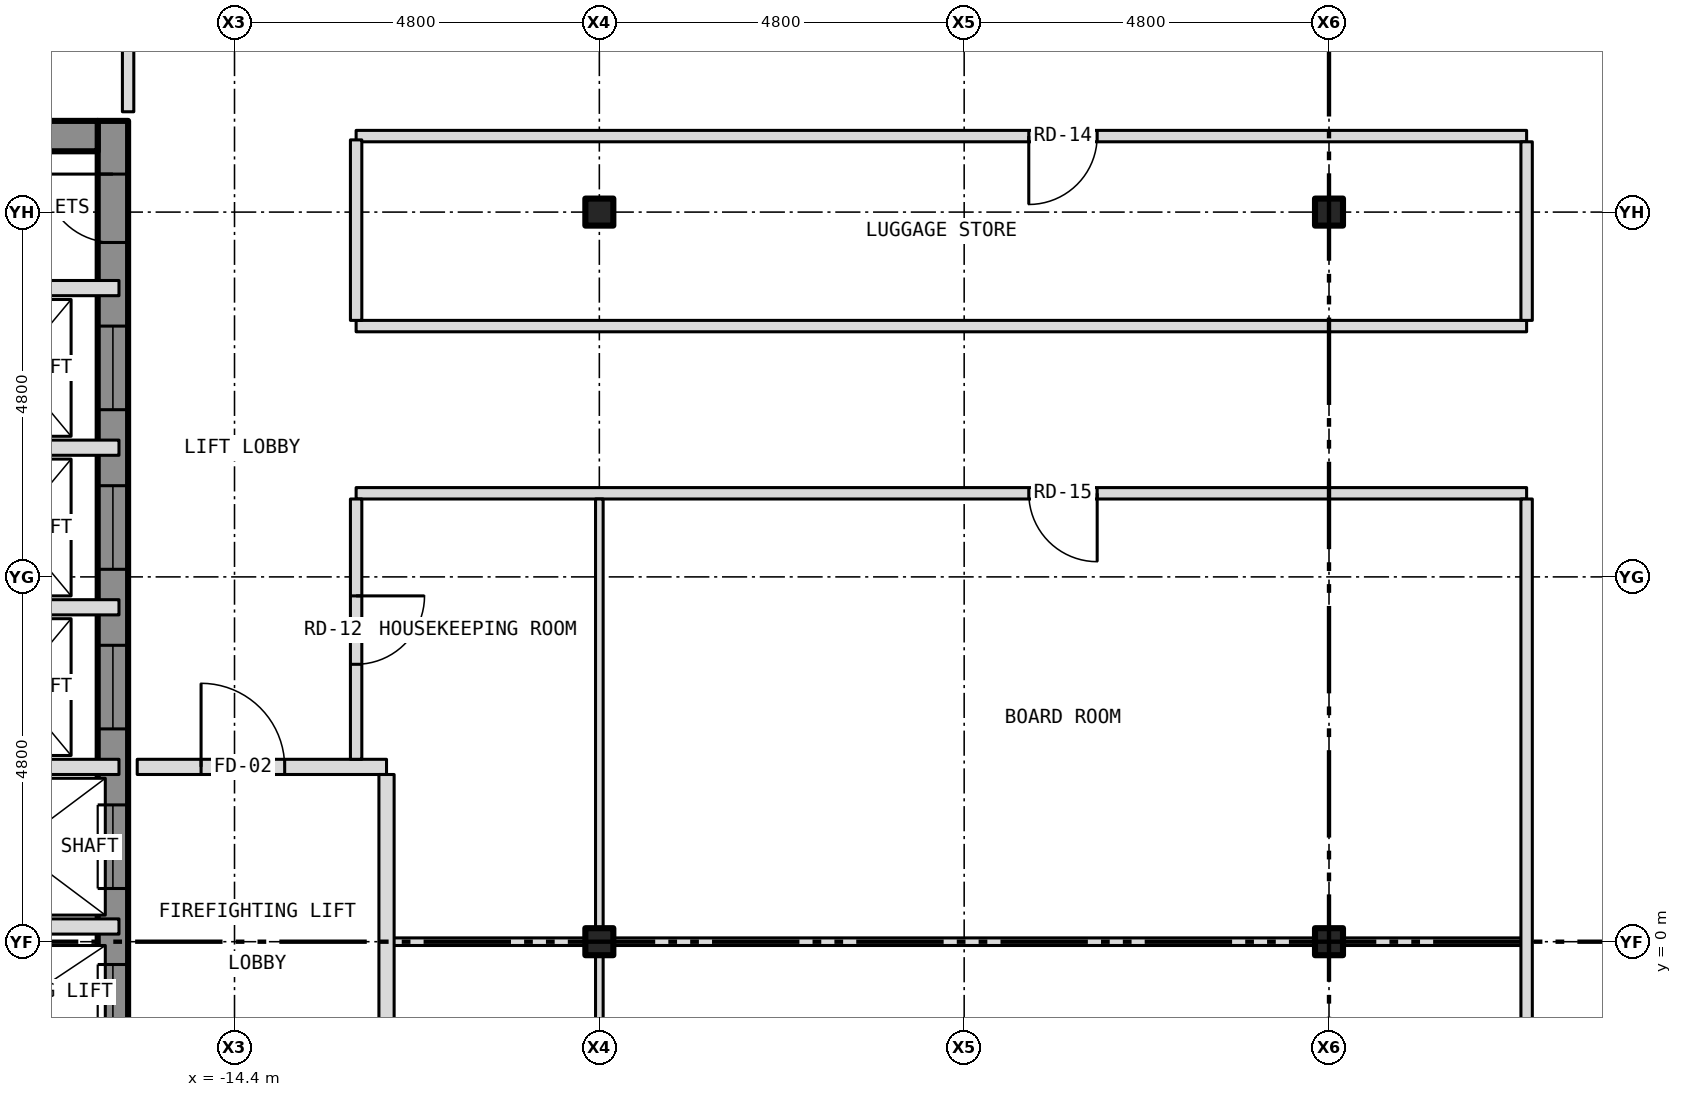
"""IFC4 building model, lengths in metres.
Left out: names, types, materials, properties, quantities, classifications, styles, units other than length and angle.
Written with IfcOpenShell. Run it as: python <this file> out.ifc"""

import sys

from ifc_helpers import new_model, si_unit, direction, frame, frame_2d, origin, origin_2d, place, context, subcontext, project, spatial, rectangle, i_section, extrude, element, fill, save


model = new_model("IFC4")
c1 = context("Model", 3, precision=1e-05, world=origin(), true_north=direction((0.0, 1.0)))
c2 = subcontext(c1, "Body", "Model", "MODEL_VIEW")
j1 = project(units=[si_unit("LENGTHUNIT", "METRE"), si_unit("PLANEANGLEUNIT", "RADIAN")], contexts=[c1])
p1 = place(None, origin())
s1 = spatial("IfcSite", under=j1, at=p1, CompositionType="ELEMENT")
p2 = place(p1, origin())
s2 = spatial("IfcBuilding", under=s1, at=p2, CompositionType="ELEMENT")
p3 = place(p2, frame((0.0, 0.0, 251.5)))
s3 = spatial("IfcBuildingStorey", under=s2, at=p3, CompositionType="ELEMENT", Elevation=251.5)
for number, where, z_axis, x_axis in (
    (1, (-9.6, 0.0, -0.15), (0.0, 0.0, 1.0), (1.0, 0.0, 0.0)),
    (2, (-9.6, 9.6, -0.15), (0.0, 0.0, 1.0), (1.0, 0.0, 0.0)),
    (3, (0.0, 0.0, -0.15), (0.0, 0.0, 1.0), (1.0, 0.0, 0.0)),
    (4, (0.0, 9.6, -0.15), (0.0, 0.0, 1.0), (1.0, 0.0, 0.0)),
):
    element("IfcColumn", number, at=place(p3, frame(where, z_axis=z_axis, x_axis=x_axis)), inside=s3, PredefinedType="COLUMN", context=c2, shape_type="SweptSolid", body=[
        extrude(i_section(OverallWidth=0.368, OverallDepth=0.356, WebThickness=0.011, FlangeThickness=0.018, at=origin_2d()), origin(), (0.0, 0.0, 1.0), 3.5),
    ])
p4 = place(p3, frame((-16.0, -10.8, 0.0), z_axis=(0.0, 0.0, 1.0), x_axis=(0.0, 1.0, 0.0)))
e5 = element("IfcWall", 5, at=p4, inside=s3, PredefinedType="SHEAR", context=c2, shape_type="SweptSolid", body=[
    extrude(rectangle(XDim=21.6, YDim=0.4, at=frame_2d((10.8, 0.0))), origin(), (0.0, 0.0, 1.0), 3.25),
])
p5 = place(p4, frame((9.4, 0.0, 0.0)))
e6 = element("IfcOpeningElement", 6, at=p5, cuts=e5, PredefinedType="OPENING", context=c2, shape_type="SweptSolid", body=[
    extrude(rectangle(XDim=1.1, YDim=2.1, at=frame_2d((0.55, 1.05))), frame((0.0, 0.212, 0.0), z_axis=(0.0, -1.0, 0.0), x_axis=(1.0, 0.0, 0.0)), (0.0, 0.0, 1.0), 0.424),
])
p6 = place(p4, frame((11.5, 0.0, 0.0)))
e7 = element("IfcOpeningElement", 7, at=p6, cuts=e5, PredefinedType="OPENING", context=c2, shape_type="SweptSolid", body=[
    extrude(rectangle(XDim=1.1, YDim=2.1, at=frame_2d((0.55, 1.05))), frame((0.0, 0.212, 0.0), z_axis=(0.0, -1.0, 0.0), x_axis=(1.0, 0.0, 0.0)), (0.0, 0.0, 1.0), 0.424),
])
p7 = place(p4, frame((13.6, 0.0, 0.0)))
e8 = element("IfcOpeningElement", 8, at=p7, cuts=e5, PredefinedType="OPENING", context=c2, shape_type="SweptSolid", body=[
    extrude(rectangle(XDim=1.1, YDim=2.1, at=frame_2d((0.55, 1.05))), frame((0.0, 0.212, 0.0), z_axis=(0.0, -1.0, 0.0), x_axis=(1.0, 0.0, 0.0)), (0.0, 0.0, 1.0), 0.424),
])
p8 = place(p4, frame((15.7, 0.0, 0.0)))
e9 = element("IfcOpeningElement", 9, at=p8, cuts=e5, PredefinedType="OPENING", context=c2, shape_type="SweptSolid", body=[
    extrude(rectangle(XDim=1.1, YDim=2.1, at=frame_2d((0.55, 1.05))), frame((0.0, 0.212, 0.0), z_axis=(0.0, -1.0, 0.0), x_axis=(1.0, 0.0, 0.0)), (0.0, 0.0, 1.0), 0.424),
])
p9 = place(p4, frame((17.8, 0.0, 0.0)))
e10 = element("IfcOpeningElement", 10, at=p9, cuts=e5, PredefinedType="OPENING", context=c2, shape_type="SweptSolid", body=[
    extrude(rectangle(XDim=1.1, YDim=2.1, at=frame_2d((0.55, 1.05))), frame((0.0, 0.212, 0.0), z_axis=(0.0, -1.0, 0.0), x_axis=(1.0, 0.0, 0.0)), (0.0, 0.0, 1.0), 0.424),
])
p10 = place(p4, frame((0.458, 0.0, 0.0)))
e11 = element("IfcOpeningElement", 11, at=p10, cuts=e5, PredefinedType="OPENING", context=c2, shape_type="SweptSolid", body=[
    extrude(rectangle(XDim=1.1, YDim=2.1, at=frame_2d((0.55, 1.05))), frame((0.0, 0.212, 0.0), z_axis=(0.0, -1.0, 0.0), x_axis=(1.0, 0.0, 0.0)), (0.0, 0.0, 1.0), 0.424),
])
p11 = place(p4, frame((7.5, 0.0, 0.0)))
e12 = element("IfcOpeningElement", 12, at=p11, cuts=e5, PredefinedType="OPENING", context=c2, shape_type="SweptSolid", body=[
    extrude(rectangle(XDim=1.1, YDim=2.1, at=frame_2d((0.55, 1.05))), frame((0.0, 0.212, 0.0), z_axis=(0.0, -1.0, 0.0), x_axis=(1.0, 0.0, 0.0)), (0.0, 0.0, 1.0), 0.424),
])
p12 = place(p4, frame((20.0, 0.0, 0.0)))
e13 = element("IfcOpeningElement", 13, at=p12, cuts=e5, PredefinedType="OPENING", context=c2, shape_type="SweptSolid", body=[
    extrude(rectangle(XDim=0.9, YDim=2.1, at=frame_2d((0.45, 1.05))), frame((0.0, 0.212, 0.0), z_axis=(0.0, -1.0, 0.0), x_axis=(1.0, 0.0, 0.0)), (0.0, 0.0, 1.0), 0.424),
])
p13 = place(p3, frame((-20.0, 10.6, 0.0), z_axis=(0.0, 0.0, 1.0), x_axis=(1.0, 0.0, 0.0)))
e14 = element("IfcWall", 14, at=p13, inside=s3, PredefinedType="SHEAR", context=c2, shape_type="SweptSolid", body=[
    extrude(rectangle(XDim=3.8, YDim=0.4, at=frame_2d((1.9, 0.0))), origin(), (0.0, 0.0, 1.0), 3.25),
])
p14 = place(p3, frame((-12.4, 0.0, 0.0), z_axis=(0.0, 0.0, 1.0), x_axis=(1.0, 0.0, 0.0)))
e15 = element("IfcWall", 15, at=p14, inside=s3, PredefinedType="PARTITIONING", context=c2, shape_type="SweptSolid", body=[
    extrude(rectangle(XDim=2.616, YDim=0.1, at=frame_2d((1.308, 0.0))), origin(), (0.0, 0.0, 1.0), 2.728),
])
p15 = place(p3, frame((-9.784, 0.0, 0.0), z_axis=(0.0, 0.0, 1.0), x_axis=(1.0, 0.0, 0.0)))
e16 = element("IfcWall", 16, at=p15, inside=s3, PredefinedType="PARTITIONING", context=c2, shape_type="SweptSolid", body=[
    extrude(rectangle(XDim=0.368, YDim=0.1, at=frame_2d((0.184, 0.0))), origin(), (0.0, 0.0, 1.0), 3.35),
])
p16 = place(p3, frame((-9.416, 0.0, 0.0), z_axis=(0.0, 0.0, 1.0), x_axis=(1.0, 0.0, 0.0)))
e17 = element("IfcWall", 17, at=p16, inside=s3, PredefinedType="PARTITIONING", context=c2, shape_type="SweptSolid", body=[
    extrude(rectangle(XDim=9.232, YDim=0.1, at=frame_2d((4.616, 0.0))), origin(), (0.0, 0.0, 1.0), 2.728),
])
p17 = place(p3, frame((-0.184, 0.0, 0.0), z_axis=(0.0, 0.0, 1.0), x_axis=(1.0, 0.0, 0.0)))
e18 = element("IfcWall", 18, at=p17, inside=s3, PredefinedType="PARTITIONING", context=c2, shape_type="SweptSolid", body=[
    extrude(rectangle(XDim=0.368, YDim=0.1, at=frame_2d((0.184, 0.0))), origin(), (0.0, 0.0, 1.0), 3.35),
])
p18 = place(p3, frame((0.184, 0.0, 0.0), z_axis=(0.0, 0.0, 1.0), x_axis=(1.0, 0.0, 0.0)))
e19 = element("IfcWall", 19, at=p18, inside=s3, PredefinedType="PARTITIONING", context=c2, shape_type="SweptSolid", body=[
    extrude(rectangle(XDim=2.416, YDim=0.1, at=frame_2d((1.208, 0.0))), origin(), (0.0, 0.0, 1.0), 2.728),
])
for number, where, z_axis, x_axis in (
    (20, (-18.8, 0.2, 0.0), (0.0, 0.0, 1.0), (1.0, 0.0, 0.0)),
    (21, (-18.8, 2.3, 0.0), (0.0, 0.0, 1.0), (1.0, 0.0, 0.0)),
):
    element("IfcWall", number, at=place(p3, frame(where, z_axis=z_axis, x_axis=x_axis)), inside=s3, PredefinedType="PARTITIONING", context=c2, shape_type="SweptSolid", body=[
        extrude(rectangle(XDim=2.88, YDim=0.2, at=frame_2d((1.44, 0.0))), origin(), (0.0, 0.0, 1.0), 3.25),
    ])
p19 = place(p3, frame((-15.68, 2.3, 0.0), z_axis=(0.0, 0.0, 1.0), x_axis=(1.0, 0.0, 0.0)))
e22 = element("IfcWall", 22, at=p19, inside=s3, PredefinedType="PARTITIONING", context=c2, shape_type="SweptSolid", body=[
    extrude(rectangle(XDim=3.28, YDim=0.2, at=frame_2d((1.64, 0.0))), origin(), (0.0, 0.0, 1.0), 3.35),
])
p20 = place(p19, frame((0.84, 0.0, 0.0)))
e23 = element("IfcOpeningElement", 23, at=p20, cuts=e22, PredefinedType="OPENING", context=c2, shape_type="SweptSolid", body=[
    extrude(rectangle(XDim=1.1, YDim=2.1, at=frame_2d((0.55, 1.05))), frame((0.0, 0.112, 0.0), z_axis=(0.0, -1.0, 0.0), x_axis=(1.0, 0.0, 0.0)), (0.0, 0.0, 1.0), 0.224),
])
p21 = place(p3, frame((-18.8, 4.4, 0.0), z_axis=(0.0, 0.0, 1.0), x_axis=(1.0, 0.0, 0.0)))
e24 = element("IfcWall", 24, at=p21, inside=s3, PredefinedType="PARTITIONING", context=c2, shape_type="SweptSolid", body=[
    extrude(rectangle(XDim=2.88, YDim=0.2, at=frame_2d((1.44, 0.0))), origin(), (0.0, 0.0, 1.0), 3.25),
])
p22 = place(p3, frame((-12.8, 5.9, 0.0), z_axis=(0.0, 0.0, 1.0), x_axis=(1.0, 0.0, 0.0)))
e25 = element("IfcWall", 25, at=p22, inside=s3, PredefinedType="PARTITIONING", context=c2, shape_type="SweptSolid", body=[
    extrude(rectangle(XDim=15.4, YDim=0.15, at=frame_2d((7.7, 0.0))), origin(), (0.0, 0.0, 1.0), 3.35),
])
p23 = place(p22, frame((8.85, 0.0, 0.0)))
e26 = element("IfcOpeningElement", 26, at=p23, cuts=e25, PredefinedType="OPENING", context=c2, shape_type="SweptSolid", body=[
    extrude(rectangle(XDim=0.9, YDim=2.1, at=frame_2d((0.45, 1.05))), frame((0.0, 0.087, 0.0), z_axis=(0.0, -1.0, 0.0), x_axis=(1.0, 0.0, 0.0)), (0.0, 0.0, 1.0), 0.174),
])
p24 = place(p3, frame((-18.8, 6.5, 0.0), z_axis=(0.0, 0.0, 1.0), x_axis=(1.0, 0.0, 0.0)))
e27 = element("IfcWall", 27, at=p24, inside=s3, PredefinedType="PARTITIONING", context=c2, shape_type="SweptSolid", body=[
    extrude(rectangle(XDim=2.88, YDim=0.2, at=frame_2d((1.44, 0.0))), origin(), (0.0, 0.0, 1.0), 3.25),
])
p25 = place(p3, frame((-12.8, 8.1, 0.0), z_axis=(0.0, 0.0, 1.0), x_axis=(1.0, 0.0, 0.0)))
e28 = element("IfcWall", 28, at=p25, inside=s3, PredefinedType="PARTITIONING", context=c2, shape_type="SweptSolid", body=[
    extrude(rectangle(XDim=15.4, YDim=0.15, at=frame_2d((7.7, 0.0))), origin(), (0.0, 0.0, 1.0), 3.35),
])
p26 = place(p3, frame((-18.8, 8.6, 0.0), z_axis=(0.0, 0.0, 1.0), x_axis=(1.0, 0.0, 0.0)))
e29 = element("IfcWall", 29, at=p26, inside=s3, PredefinedType="PARTITIONING", context=c2, shape_type="SweptSolid", body=[
    extrude(rectangle(XDim=2.88, YDim=0.2, at=frame_2d((1.44, 0.0))), origin(), (0.0, 0.0, 1.0), 3.25),
])
p27 = place(p3, frame((-12.8, 10.6, 0.0), z_axis=(0.0, 0.0, 1.0), x_axis=(1.0, 0.0, 0.0)))
e30 = element("IfcWall", 30, at=p27, inside=s3, PredefinedType="PARTITIONING", context=c2, shape_type="SweptSolid", body=[
    extrude(rectangle(XDim=15.4, YDim=0.15, at=frame_2d((7.7, 0.0))), origin(), (0.0, 0.0, 1.0), 3.35),
])
p28 = place(p27, frame((8.85, 0.0, 0.0)))
e31 = element("IfcOpeningElement", 31, at=p28, cuts=e30, PredefinedType="OPENING", context=c2, shape_type="SweptSolid", body=[
    extrude(rectangle(XDim=0.9, YDim=2.1, at=frame_2d((0.45, 1.05))), frame((0.0, 0.087, 0.0), z_axis=(0.0, -1.0, 0.0), x_axis=(1.0, 0.0, 0.0)), (0.0, 0.0, 1.0), 0.174),
])
p29 = place(p3, frame((-15.8, 10.92, 0.0), z_axis=(0.0, 0.0, 1.0), x_axis=(0.0, 1.0, 0.0)))
e32 = element("IfcWall", 32, at=p29, inside=s3, PredefinedType="PARTITIONING", context=c2, shape_type="SweptSolid", body=[
    extrude(rectangle(XDim=1.805, YDim=0.15, at=frame_2d((0.903, 0.0))), origin(), (0.0, 0.0, 1.0), 3.35),
])
p30 = place(p3, frame((-12.8, 2.4, 0.0), z_axis=(0.0, 0.0, 1.0), x_axis=(0.0, 1.0, 0.0)))
e33 = element("IfcWall", 33, at=p30, inside=s3, PredefinedType="PARTITIONING", context=c2, shape_type="SweptSolid", body=[
    extrude(rectangle(XDim=3.425, YDim=0.15, at=frame_2d((1.712, 0.0))), origin(), (0.0, 0.0, 1.0), 3.35),
])
p31 = place(p30, frame((1.25, 0.0, 0.0)))
e34 = element("IfcOpeningElement", 34, at=p31, cuts=e33, PredefinedType="OPENING", context=c2, shape_type="SweptSolid", body=[
    extrude(rectangle(XDim=0.9, YDim=2.1, at=frame_2d((0.45, 1.05))), frame((0.0, 0.087, 0.0), z_axis=(0.0, -1.0, 0.0), x_axis=(1.0, 0.0, 0.0)), (0.0, 0.0, 1.0), 0.174),
])
p32 = place(p3, frame((-12.8, 8.175, 0.0), z_axis=(0.0, 0.0, 1.0), x_axis=(0.0, 1.0, 0.0)))
e35 = element("IfcWall", 35, at=p32, inside=s3, PredefinedType="PARTITIONING", context=c2, shape_type="SweptSolid", body=[
    extrude(rectangle(XDim=2.375, YDim=0.15, at=frame_2d((1.188, 0.0))), origin(), (0.0, 0.0, 1.0), 3.35),
])
p33 = place(p3, frame((-12.4, -1.8, 0.0), z_axis=(0.0, 0.0, 1.0), x_axis=(0.0, 1.0, 0.0)))
e36 = element("IfcWall", 36, at=p33, inside=s3, PredefinedType="PARTITIONING", context=c2, shape_type="SweptSolid", body=[
    extrude(rectangle(XDim=4.0, YDim=0.2, at=frame_2d((2.0, 0.0))), origin(), (0.0, 0.0, 1.0), 3.35),
])
p34 = place(p3, frame((-9.6, -9.416, 0.0), z_axis=(0.0, 0.0, 1.0), x_axis=(0.0, 1.0, 0.0)))
e37 = element("IfcWall", 37, at=p34, inside=s3, PredefinedType="PARTITIONING", context=c2, shape_type="SweptSolid", body=[
    extrude(rectangle(XDim=9.366, YDim=0.1, at=frame_2d((4.683, 0.0))), origin(), (0.0, 0.0, 1.0), 2.728),
])
p35 = place(p3, frame((-9.6, 0.05, 0.0), z_axis=(0.0, 0.0, 1.0), x_axis=(0.0, 1.0, 0.0)))
e38 = element("IfcWall", 38, at=p35, inside=s3, PredefinedType="PARTITIONING", context=c2, shape_type="SweptSolid", body=[
    extrude(rectangle(XDim=5.775, YDim=0.1, at=frame_2d((2.887, 0.0))), origin(), (0.0, 0.0, 1.0), 2.728),
])
p36 = place(p3, frame((2.6, -10.525, 0.0), z_axis=(0.0, 0.0, 1.0), x_axis=(0.0, 1.0, 0.0)))
e39 = element("IfcWall", 39, at=p36, inside=s3, PredefinedType="PARTITIONING", context=c2, shape_type="SweptSolid", body=[
    extrude(rectangle(XDim=16.35, YDim=0.15, at=frame_2d((8.175, 0.0))), origin(), (0.0, 0.0, 1.0), 3.35),
])
p37 = place(p3, frame((2.6, 8.175, 0.0), z_axis=(0.0, 0.0, 1.0), x_axis=(0.0, 1.0, 0.0)))
e40 = element("IfcWall", 40, at=p37, inside=s3, PredefinedType="PARTITIONING", context=c2, shape_type="SweptSolid", body=[
    extrude(rectangle(XDim=2.35, YDim=0.15, at=frame_2d((1.175, 0.0))), origin(), (0.0, 0.0, 1.0), 3.35),
])
p38 = place(p5, origin())
e41 = element("IfcDoor", 41, at=p38, inside=s3, OperationType="SLIDING_TO_LEFT", PredefinedType="DOOR", context=c2, shape_type="SweptSolid", body=[
    extrude(rectangle(XDim=1.1, YDim=2.1, at=frame_2d((0.55, 1.05))), frame((0.0, 0.025, 0.0), z_axis=(0.0, -1.0, 0.0), x_axis=(1.0, 0.0, 0.0)), (0.0, 0.0, 1.0), 0.05),
])
fill(e6, e41)
p39 = place(p6, origin())
e42 = element("IfcDoor", 42, at=p39, inside=s3, OperationType="SLIDING_TO_LEFT", PredefinedType="DOOR", context=c2, shape_type="SweptSolid", body=[
    extrude(rectangle(XDim=1.1, YDim=2.1, at=frame_2d((0.55, 1.05))), frame((0.0, 0.025, 0.0), z_axis=(0.0, -1.0, 0.0), x_axis=(1.0, 0.0, 0.0)), (0.0, 0.0, 1.0), 0.05),
])
fill(e7, e42)
p40 = place(p7, origin())
e43 = element("IfcDoor", 43, at=p40, inside=s3, OperationType="SLIDING_TO_LEFT", PredefinedType="DOOR", context=c2, shape_type="SweptSolid", body=[
    extrude(rectangle(XDim=1.1, YDim=2.1, at=frame_2d((0.55, 1.05))), frame((0.0, 0.025, 0.0), z_axis=(0.0, -1.0, 0.0), x_axis=(1.0, 0.0, 0.0)), (0.0, 0.0, 1.0), 0.05),
])
fill(e8, e43)
p41 = place(p8, origin())
e44 = element("IfcDoor", 44, at=p41, inside=s3, OperationType="SLIDING_TO_LEFT", PredefinedType="DOOR", context=c2, shape_type="SweptSolid", body=[
    extrude(rectangle(XDim=1.1, YDim=2.1, at=frame_2d((0.55, 1.05))), frame((0.0, 0.025, 0.0), z_axis=(0.0, -1.0, 0.0), x_axis=(1.0, 0.0, 0.0)), (0.0, 0.0, 1.0), 0.05),
])
fill(e9, e44)
p42 = place(p9, origin())
e45 = element("IfcDoor", 45, at=p42, inside=s3, OperationType="SLIDING_TO_LEFT", PredefinedType="DOOR", context=c2, shape_type="SweptSolid", body=[
    extrude(rectangle(XDim=1.1, YDim=2.1, at=frame_2d((0.55, 1.05))), frame((0.0, 0.025, 0.0), z_axis=(0.0, -1.0, 0.0), x_axis=(1.0, 0.0, 0.0)), (0.0, 0.0, 1.0), 0.05),
])
fill(e10, e45)
p43 = place(p12, origin())
e46 = element("IfcDoor", 46, at=p43, inside=s3, OperationType="SINGLE_SWING_RIGHT", PredefinedType="DOOR", context=c2, shape_type="SweptSolid", body=[
    extrude(rectangle(XDim=0.9, YDim=2.1, at=frame_2d((0.45, 1.05))), frame((0.0, 0.025, 0.0), z_axis=(0.0, -1.0, 0.0), x_axis=(1.0, 0.0, 0.0)), (0.0, 0.0, 1.0), 0.05),
])
fill(e13, e46)
p44 = place(p20, origin())
e47 = element("IfcDoor", 47, at=p44, inside=s3, OperationType="SINGLE_SWING_LEFT", PredefinedType="DOOR", context=c2, shape_type="SweptSolid", body=[
    extrude(rectangle(XDim=1.1, YDim=2.1, at=frame_2d((0.55, 1.05))), frame((0.0, 0.025, 0.0), z_axis=(0.0, -1.0, 0.0), x_axis=(1.0, 0.0, 0.0)), (0.0, 0.0, 1.0), 0.05),
])
fill(e23, e47)
p45 = place(p31, origin())
e48 = element("IfcDoor", 48, at=p45, inside=s3, OperationType="SINGLE_SWING_RIGHT", PredefinedType="DOOR", context=c2, shape_type="SweptSolid", body=[
    extrude(rectangle(XDim=0.9, YDim=2.1, at=frame_2d((0.45, 1.05))), frame((0.0, 0.025, 0.0), z_axis=(0.0, -1.0, 0.0), x_axis=(1.0, 0.0, 0.0)), (0.0, 0.0, 1.0), 0.05),
])
fill(e34, e48)
p46 = place(p28, origin())
e49 = element("IfcDoor", 49, at=p46, inside=s3, OperationType="SINGLE_SWING_LEFT", PredefinedType="DOOR", context=c2, shape_type="SweptSolid", body=[
    extrude(rectangle(XDim=0.9, YDim=2.1, at=frame_2d((0.45, 1.05))), frame((0.0, 0.025, 0.0), z_axis=(0.0, -1.0, 0.0), x_axis=(1.0, 0.0, 0.0)), (0.0, 0.0, 1.0), 0.05),
])
fill(e31, e49)
p47 = place(p23, origin())
e50 = element("IfcDoor", 50, at=p47, inside=s3, OperationType="SINGLE_SWING_RIGHT", PredefinedType="DOOR", context=c2, shape_type="SweptSolid", body=[
    extrude(rectangle(XDim=0.9, YDim=2.1, at=frame_2d((0.45, 1.05))), frame((0.0, 0.025, 0.0), z_axis=(0.0, -1.0, 0.0), x_axis=(1.0, 0.0, 0.0)), (0.0, 0.0, 1.0), 0.05),
])
fill(e26, e50)
save(model, sys.argv[1])
